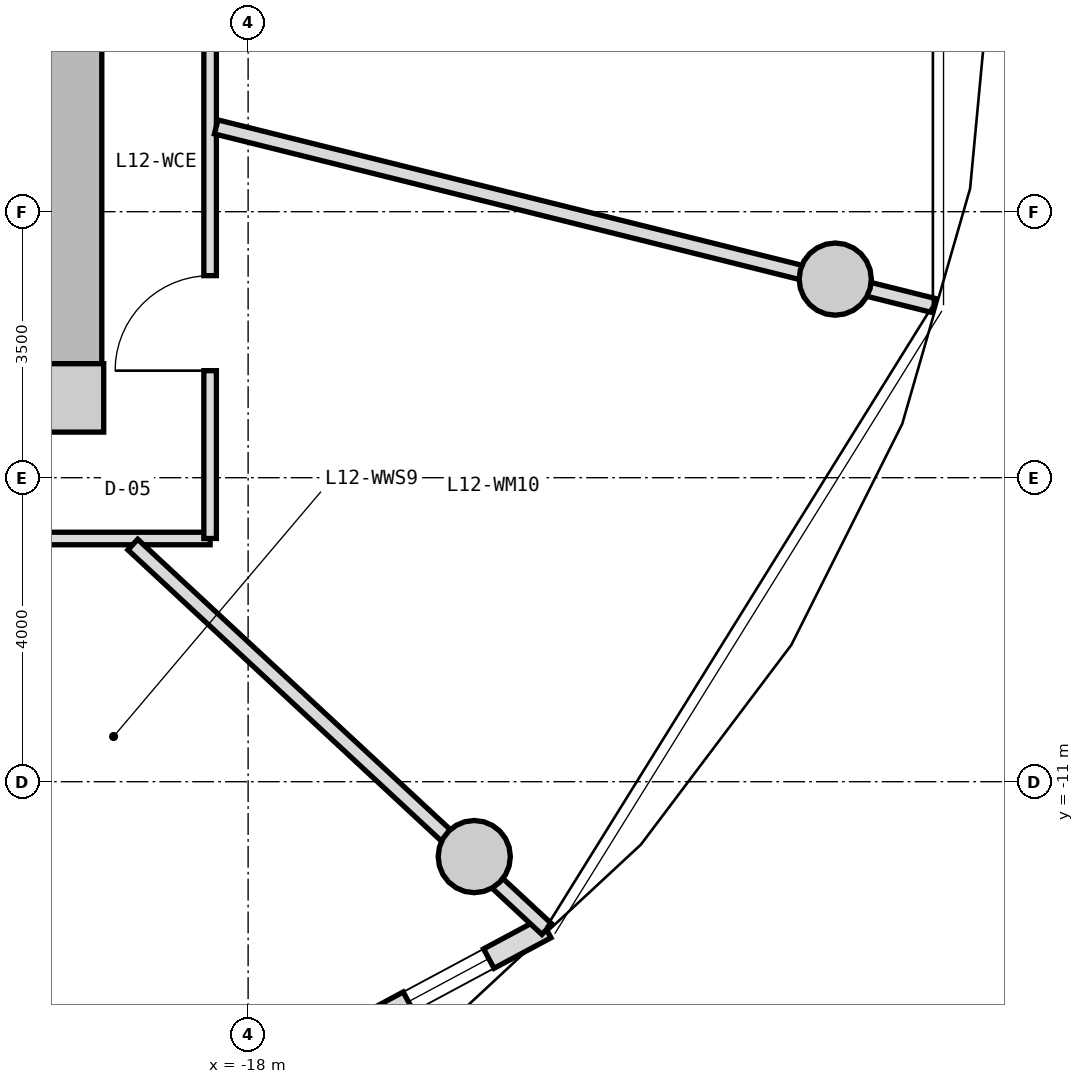
"""IFC4 building model, lengths in metres.
Left out: names, types, materials, properties, quantities, classifications, styles, units other than length and angle.
Written with IfcOpenShell. Run it as: python <this file> out.ifc"""

import sys

from ifc_helpers import new_model, si_unit, direction, frame, frame_2d, origin, origin_2d, place, context, subcontext, project, spatial, rectangle, circle, extrude, source, transform, mapped, element, fill, save


model = new_model("IFC4")
c1 = context("Model", 3, precision=1e-05, world=origin(), true_north=direction((0.0, 1.0)))
c2 = subcontext(c1, "Body", "Model", "MODEL_VIEW")
j1 = project(units=[si_unit("LENGTHUNIT", "METRE"), si_unit("PLANEANGLEUNIT", "RADIAN")], contexts=[c1])
p1 = place(None, origin())
s1 = spatial("IfcSite", under=j1, at=p1, CompositionType="ELEMENT")
p2 = place(p1, origin())
s2 = spatial("IfcBuilding", under=s1, at=p2, CompositionType="ELEMENT")
p3 = place(p2, frame((0.0, 0.0, 42.95)))
s3 = spatial("IfcBuildingStorey", under=s2, at=p3, CompositionType="ELEMENT", Elevation=42.95)
m1 = source(origin(), c2, "Body", "SweptSolid", [
    extrude(rectangle(XDim=0.9, YDim=0.9, at=origin_2d()), origin(), (0.0, 0.0, 1.0), 3.05),
])
p4 = place(p3, frame((-20.35, -5.95, 0.0), z_axis=(0.0, 0.0, 1.0), x_axis=(1.0, 0.0, 0.0)))
e1 = element("IfcColumn", 1, at=p4, inside=s3, PredefinedType="COLUMN", context=c2, shape_type="MappedRepresentation", body=[
    mapped(m1, transform((0.0, 0.0, 0.0), x_axis=(1.0, 0.0, 0.0), y_axis=(0.0, 1.0, 0.0), z_axis=(0.0, 0.0, 1.0), scale=1.0)),
])
m2 = source(origin(), c2, "Body", "SweptSolid", [
    extrude(rectangle(XDim=11.0, YDim=0.85, at=frame_2d((5.5, 0.0))), origin(), (0.0, 0.0, 1.0), 2.79),
])
p5 = place(p3, frame((-20.35, 5.5, 0.0), z_axis=(0.0, 0.0, 1.0), x_axis=(0.0, -1.0, 0.0)))
e2 = element("IfcWall", 2, at=p5, inside=s3, PredefinedType="SHEAR", context=c2, shape_type="MappedRepresentation", body=[
    mapped(m2, transform((0.0, 0.0, 0.0), x_axis=(1.0, 0.0, 0.0), y_axis=(0.0, 1.0, 0.0), z_axis=(0.0, 0.0, 1.0), scale=1.0)),
])
p6 = place(p5, frame((5.65, 0.0, 0.0)))
e3 = element("IfcOpeningElement", 3, at=p6, cuts=e2, PredefinedType="OPENING", context=c2, shape_type="SweptSolid", body=[
    extrude(rectangle(XDim=1.2, YDim=2.15, at=frame_2d((0.6, 1.075))), frame((0.0, 0.435, 0.0), z_axis=(0.0, -1.0, 0.0), x_axis=(1.0, 0.0, 0.0)), (0.0, 0.0, 1.0), 0.87),
])
m3 = source(origin(), c2, "Body", "SweptSolid", [
    extrude(circle(Radius=0.475, at=origin_2d()), origin(), (0.0, 0.0, 1.0), 3.05),
])
for number, where, z_axis, x_axis in (
    (4, (-15.025, -11.985, 0.0), (0.0, 0.0, 1.0), (1.0, 0.0, 0.0)),
    (5, (-10.275, -4.387, 0.0), (0.0, 0.0, 1.0), (1.0, 0.0, 0.0)),
):
    element("IfcColumn", number, at=place(p3, frame(where, z_axis=z_axis, x_axis=x_axis)), inside=s3, PredefinedType="COLUMN", context=c2, shape_type="MappedRepresentation", body=[
        mapped(m3, transform((0.0, 0.0, 0.0), x_axis=(1.0, 0.0, 0.0), y_axis=(0.0, 1.0, 0.0), z_axis=(0.0, 0.0, 1.0), scale=1.0)),
    ])
m4 = source(origin(), c2, "Body", "SweptSolid", [
    extrude(rectangle(XDim=10.011, YDim=0.29, at=frame_2d((5.005, 0.0))), origin(), (0.0, 0.0, 1.0), 2.79),
])
p7 = place(p3, frame((-14.084, -12.926, 0.0), z_axis=(0.0, 0.0, 1.0), x_axis=(-0.881272505317, -0.472608475773, 0.0)))
e6 = element("IfcWall", 6, at=p7, inside=s3, PredefinedType="SOLIDWALL", context=c2, shape_type="MappedRepresentation", body=[
    mapped(m4, transform((0.0, 0.0, 0.0), x_axis=(1.0, 0.0, 0.0), y_axis=(0.0, 1.0, 0.0), z_axis=(0.0, 0.0, 1.0), scale=1.0)),
])
p8 = place(p7, frame((7.86, 0.0, 0.0)))
e7 = element("IfcOpeningElement", 7, at=p8, cuts=e6, PredefinedType="OPENING", context=c2, shape_type="SweptSolid", body=[
    extrude(rectangle(XDim=1.15, YDim=2.25, at=frame_2d((0.575, 1.125))), frame((0.0, 0.155, 0.0), z_axis=(0.0, -1.0, 0.0), x_axis=(1.0, 0.0, 0.0)), (0.0, 0.0, 1.0), 0.31),
])
p9 = place(p7, frame((0.85, 0.0, 0.85)))
e8 = element("IfcOpeningElement", 8, at=p9, cuts=e6, PredefinedType="OPENING", context=c2, shape_type="SweptSolid", body=[
    extrude(rectangle(XDim=1.2, YDim=1.5, at=frame_2d((0.6, 0.75))), frame((0.0, 0.155, 0.0), z_axis=(0.0, -1.0, 0.0), x_axis=(1.0, 0.0, 0.0)), (0.0, 0.0, 1.0), 0.31),
])
m5 = source(origin(), c2, "Body", "SweptSolid", [
    extrude(rectangle(XDim=19.0, YDim=0.165, at=frame_2d((9.5, 0.0))), origin(), (0.0, 0.0, 1.0), 2.775),
])
p10 = place(p3, frame((-18.5, -7.8, 0.0), z_axis=(0.0, 0.0, 1.0), x_axis=(-1.0, 0.0, 0.0)))
e9 = element("IfcWall", 9, at=p10, inside=s3, PredefinedType="PARTITIONING", context=c2, shape_type="MappedRepresentation", body=[
    mapped(m5, transform((0.0, 0.0, 0.0), x_axis=(1.0, 0.0, 0.0), y_axis=(0.0, 1.0, 0.0), z_axis=(0.0, 0.0, 1.0), scale=1.0)),
])
p11 = place(p10, frame((15.652, 0.0, 0.0)))
e10 = element("IfcOpeningElement", 10, at=p11, cuts=e9, PredefinedType="OPENING", context=c2, shape_type="SweptSolid", body=[
    extrude(rectangle(XDim=1.05, YDim=2.15, at=frame_2d((0.525, 1.075))), frame((0.0, 0.093, 0.0), z_axis=(0.0, -1.0, 0.0), x_axis=(1.0, 0.0, 0.0)), (0.0, 0.0, 1.0), 0.185),
])
p12 = place(p10, frame((12.5, 0.0, 0.0)))
e11 = element("IfcOpeningElement", 11, at=p12, cuts=e9, PredefinedType="OPENING", context=c2, shape_type="SweptSolid", body=[
    extrude(rectangle(XDim=1.05, YDim=2.15, at=frame_2d((0.525, 1.075))), frame((0.0, 0.093, 0.0), z_axis=(0.0, -1.0, 0.0), x_axis=(1.0, 0.0, 0.0)), (0.0, 0.0, 1.0), 0.185),
])
p13 = place(p10, frame((10.104, 0.0, 0.0)))
e12 = element("IfcOpeningElement", 12, at=p13, cuts=e9, PredefinedType="OPENING", context=c2, shape_type="SweptSolid", body=[
    extrude(rectangle(XDim=1.05, YDim=2.15, at=frame_2d((0.525, 1.075))), frame((0.0, 0.093, 0.0), z_axis=(0.0, -1.0, 0.0), x_axis=(1.0, 0.0, 0.0)), (0.0, 0.0, 1.0), 0.185),
])
p14 = place(p10, frame((7.806, 0.0, 0.0)))
e13 = element("IfcOpeningElement", 13, at=p14, cuts=e9, PredefinedType="OPENING", context=c2, shape_type="SweptSolid", body=[
    extrude(rectangle(XDim=1.05, YDim=2.15, at=frame_2d((0.525, 1.075))), frame((0.0, 0.093, 0.0), z_axis=(0.0, -1.0, 0.0), x_axis=(1.0, 0.0, 0.0)), (0.0, 0.0, 1.0), 0.185),
])
p15 = place(p10, frame((5.915, 0.0, 0.0)))
e14 = element("IfcOpeningElement", 14, at=p15, cuts=e9, PredefinedType="OPENING", context=c2, shape_type="SweptSolid", body=[
    extrude(rectangle(XDim=0.92, YDim=2.1, at=frame_2d((0.46, 1.05))), frame((0.0, 0.093, 0.0), z_axis=(0.0, -1.0, 0.0), x_axis=(1.0, 0.0, 0.0)), (0.0, 0.0, 1.0), 0.185),
])
p16 = place(p10, frame((2.769, 0.0, 0.0)))
e15 = element("IfcOpeningElement", 15, at=p16, cuts=e9, PredefinedType="OPENING", context=c2, shape_type="SweptSolid", body=[
    extrude(rectangle(XDim=0.92, YDim=2.1, at=frame_2d((0.46, 1.05))), frame((0.0, 0.093, 0.0), z_axis=(0.0, -1.0, 0.0), x_axis=(1.0, 0.0, 0.0)), (0.0, 0.0, 1.0), 0.185),
])
m6 = source(origin(), c2, "Body", "SweptSolid", [
    extrude(rectangle(XDim=15.6, YDim=0.165, at=frame_2d((7.8, 0.0))), origin(), (0.0, 0.0, 1.0), 2.775),
])
p17 = place(p3, frame((-18.5, 7.8, 0.0), z_axis=(0.0, 0.0, 1.0), x_axis=(0.0, -1.0, 0.0)))
e16 = element("IfcWall", 16, at=p17, inside=s3, PredefinedType="PARTITIONING", context=c2, shape_type="MappedRepresentation", body=[
    mapped(m6, transform((0.0, 0.0, 0.0), x_axis=(1.0, 0.0, 0.0), y_axis=(0.0, 1.0, 0.0), z_axis=(0.0, 0.0, 1.0), scale=1.0)),
])
p18 = place(p17, frame((12.141, 0.0, 0.0)))
e17 = element("IfcOpeningElement", 17, at=p18, cuts=e16, PredefinedType="OPENING", context=c2, shape_type="SweptSolid", body=[
    extrude(rectangle(XDim=1.25, YDim=2.2, at=frame_2d((0.625, 1.1))), frame((0.0, 0.093, 0.0), z_axis=(0.0, -1.0, 0.0), x_axis=(1.0, 0.0, 0.0)), (0.0, 0.0, 1.0), 0.185),
])
p19 = place(p17, frame((7.175, 0.0, 0.0)))
e18 = element("IfcOpeningElement", 18, at=p19, cuts=e16, PredefinedType="OPENING", context=c2, shape_type="SweptSolid", body=[
    extrude(rectangle(XDim=1.25, YDim=2.2, at=frame_2d((0.625, 1.1))), frame((0.0, 0.093, 0.0), z_axis=(0.0, -1.0, 0.0), x_axis=(1.0, 0.0, 0.0)), (0.0, 0.0, 1.0), 0.185),
])
p20 = place(p17, frame((2.826, 0.0, 0.0)))
e19 = element("IfcOpeningElement", 19, at=p20, cuts=e16, PredefinedType="OPENING", context=c2, shape_type="SweptSolid", body=[
    extrude(rectangle(XDim=1.05, YDim=2.15, at=frame_2d((0.525, 1.075))), frame((0.0, 0.093, 0.0), z_axis=(0.0, -1.0, 0.0), x_axis=(1.0, 0.0, 0.0)), (0.0, 0.0, 1.0), 0.185),
])
p21 = place(p17, frame((0.881, 0.0, 0.0)))
e20 = element("IfcOpeningElement", 20, at=p21, cuts=e16, PredefinedType="OPENING", context=c2, shape_type="SweptSolid", body=[
    extrude(rectangle(XDim=1.05, YDim=2.15, at=frame_2d((0.525, 1.075))), frame((0.0, 0.093, 0.0), z_axis=(0.0, -1.0, 0.0), x_axis=(1.0, 0.0, 0.0)), (0.0, 0.0, 1.0), 0.185),
])
m7 = source(origin(), c2, "Body", "SweptSolid", [
    extrude(rectangle(XDim=7.435, YDim=0.19, at=frame_2d((3.717, 0.0))), origin(), (0.0, 0.0, 1.0), 2.225),
])
p22 = place(p3, frame((-19.517, -7.88, 0.0), z_axis=(0.0, 0.0, 1.0), x_axis=(0.732651956848, -0.680603489652, 0.0)))
e21 = element("IfcWall", 21, at=p22, inside=s3, PredefinedType="PARTITIONING", context=c2, shape_type="MappedRepresentation", body=[
    mapped(m7, transform((0.0, 0.0, 0.0), x_axis=(1.0, 0.0, 0.0), y_axis=(0.0, 1.0, 0.0), z_axis=(0.0, 0.0, 1.0), scale=1.0)),
])
m8 = source(origin(), c2, "Body", "SweptSolid", [
    extrude(rectangle(XDim=9.225, YDim=0.14, at=frame_2d((4.613, 0.0))), origin(), (0.0, 0.0, 1.0), 2.775),
])
p23 = place(p3, frame((-24.054, -7.83, 0.0), z_axis=(0.0, 0.0, 1.0), x_axis=(0.450460543767, -0.892796336523, 0.0)))
e22 = element("IfcWall", 22, at=p23, inside=s3, PredefinedType="PARTITIONING", context=c2, shape_type="MappedRepresentation", body=[
    mapped(m8, transform((0.0, 0.0, 0.0), x_axis=(1.0, 0.0, 0.0), y_axis=(0.0, 1.0, 0.0), z_axis=(0.0, 0.0, 1.0), scale=1.0)),
])
m9 = source(origin(), c2, "Body", "SweptSolid", [
    extrude(rectangle(XDim=9.737, YDim=0.19, at=frame_2d((4.869, 0.0))), origin(), (0.0, 0.0, 1.0), 2.225),
])
p24 = place(p3, frame((-18.42, -2.385, 0.0), z_axis=(0.0, 0.0, 1.0), x_axis=(0.970392716238, -0.241532557375, 0.0)))
e23 = element("IfcWall", 23, at=p24, inside=s3, PredefinedType="PARTITIONING", context=c2, shape_type="MappedRepresentation", body=[
    mapped(m9, transform((0.0, 0.0, 0.0), x_axis=(1.0, 0.0, 0.0), y_axis=(0.0, 1.0, 0.0), z_axis=(0.0, 0.0, 1.0), scale=1.0)),
])
m10 = source(origin(), c2, "Body", "SweptSolid", [
    extrude(rectangle(XDim=1.2, YDim=1.5, at=frame_2d((0.6, 0.75))), frame((0.0, 0.03, 0.0), z_axis=(0.0, -1.0, 0.0), x_axis=(1.0, 0.0, 0.0)), (0.0, 0.0, 1.0), 0.06),
])
p25 = place(p9, origin())
e24 = element("IfcWindow", 24, at=p25, inside=s3, PartitioningType="SINGLE_PANEL", PredefinedType="WINDOW", context=c2, shape_type="MappedRepresentation", body=[
    mapped(m10, transform((0.0, 0.0, 0.0), x_axis=(1.0, 0.0, 0.0), y_axis=(0.0, 1.0, 0.0), z_axis=(0.0, 0.0, 1.0), scale=1.0)),
])
fill(e8, e24)
m11 = source(origin(), c2, "Body", "SweptSolid", [
    extrude(rectangle(XDim=1.25, YDim=2.2, at=frame_2d((0.625, 1.1))), frame((0.0, 0.025, 0.0), z_axis=(0.0, -1.0, 0.0), x_axis=(1.0, 0.0, 0.0)), (0.0, 0.0, 1.0), 0.05),
])
p26 = place(p18, frame((1.25, 0.0, 0.0), z_axis=(0.0, 0.0, 1.0), x_axis=(-1.0, 0.0, 0.0)))
e25 = element("IfcDoor", 25, at=p26, inside=s3, OperationType="SINGLE_SWING_LEFT", PredefinedType="DOOR", context=c2, shape_type="MappedRepresentation", body=[
    mapped(m11, transform((0.0, 0.0, 0.0), x_axis=(1.0, 0.0, 0.0), y_axis=(0.0, 1.0, 0.0), z_axis=(0.0, 0.0, 1.0), scale=1.0)),
])
fill(e17, e25)
save(model, sys.argv[1])
